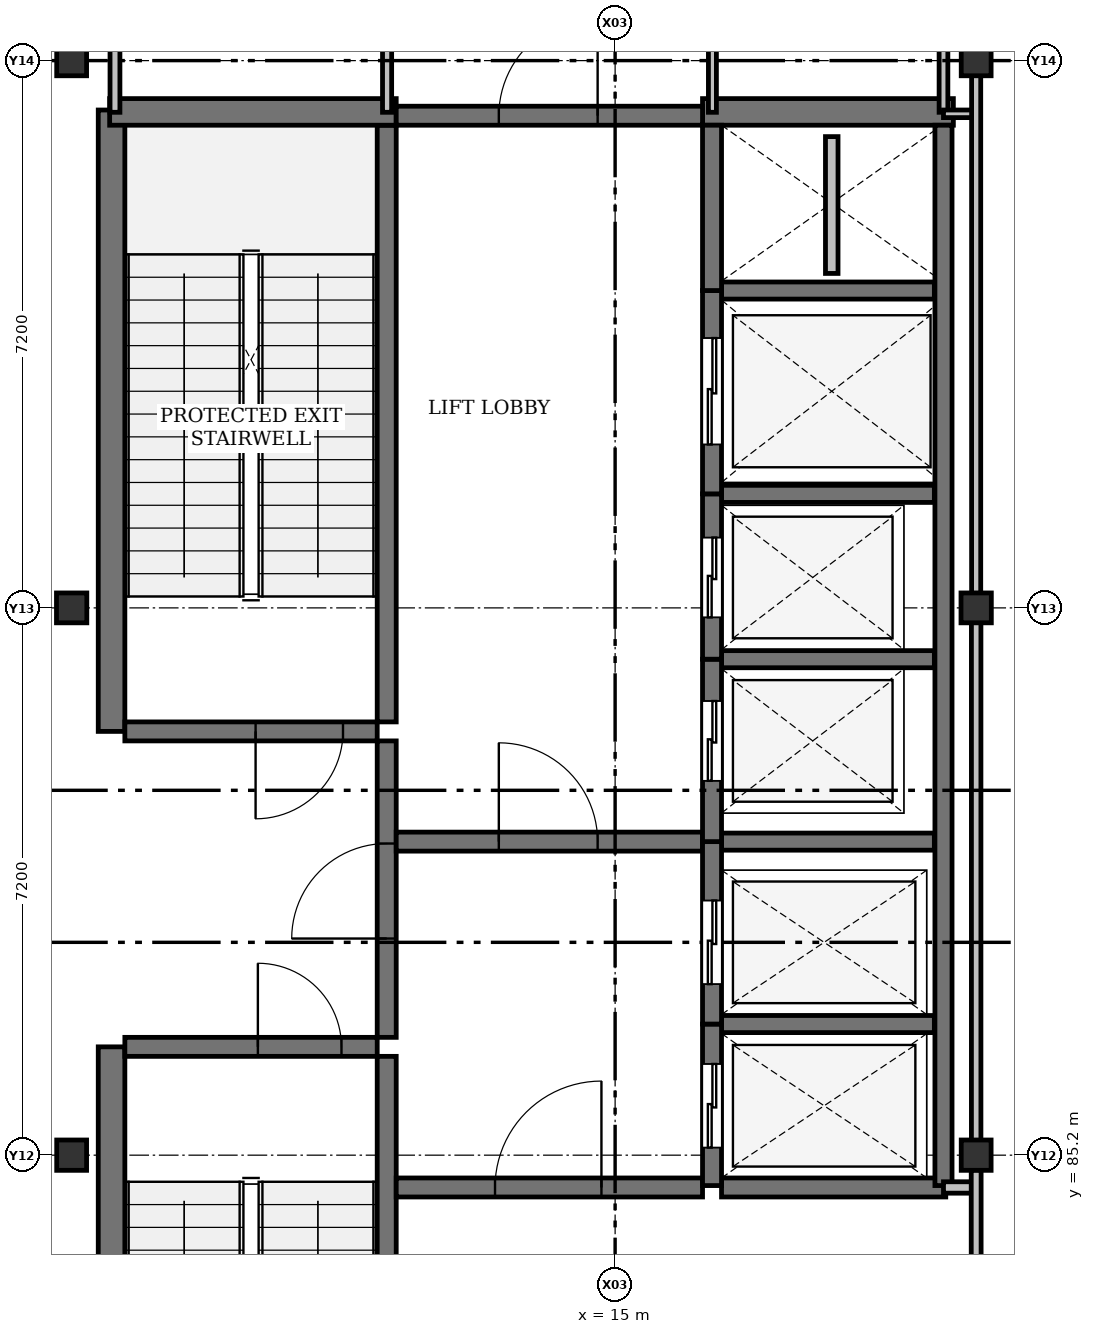
"""IFC4 building model, lengths in metres.
Left out: names, types, materials, properties, quantities, classifications, styles, units other than length and angle.
Written with IfcOpenShell. Run it as: python <this file> out.ifc"""

import sys

from ifc_helpers import new_model, si_unit, direction, frame, frame_2d, origin, origin_2d, place, context, subcontext, project, spatial, rectangle, i_section, extrude, element, fill, save


model = new_model("IFC4")
c1 = context("Model", 3, precision=1e-05, world=origin(), true_north=direction((0.0, 1.0)))
c2 = subcontext(c1, "Body", "Model", "MODEL_VIEW")
j1 = project(units=[si_unit("LENGTHUNIT", "METRE"), si_unit("PLANEANGLEUNIT", "RADIAN")], contexts=[c1])
p1 = place(None, origin())
s1 = spatial("IfcSite", under=j1, at=p1, CompositionType="ELEMENT")
p2 = place(p1, origin())
s2 = spatial("IfcBuilding", under=s1, at=p2, CompositionType="ELEMENT")
p3 = place(p2, origin())
s3 = spatial("IfcBuildingStorey", under=s2, at=p3, CompositionType="ELEMENT", Elevation=0.0)
for number, where, z_axis, x_axis in (
    (1, (7.85, 85.2, 0.0), (0.0, 0.0, 1.0), (0.0, 1.0, 0.0)),
    (2, (19.75, 85.2, 0.0), (0.0, 0.0, 1.0), (0.0, 1.0, 0.0)),
    (3, (7.85, 92.4, 0.0), (0.0, 0.0, 1.0), (1.0, 0.0, 0.0)),
    (4, (19.75, 92.4, 0.0), (0.0, 0.0, 1.0), (1.0, 0.0, 0.0)),
    (5, (7.85, 99.6, 0.0), (0.0, 0.0, 1.0), (0.0, 1.0, 0.0)),
    (6, (19.75, 99.6, 0.0), (0.0, 0.0, 1.0), (0.0, 1.0, 0.0)),
):
    element("IfcColumn", number, at=place(p3, frame(where, z_axis=z_axis, x_axis=x_axis)), inside=s3, PredefinedType="COLUMN", context=c2, shape_type="SweptSolid", body=[
        extrude(i_section(OverallWidth=0.399, OverallDepth=0.393, WebThickness=0.023, FlangeThickness=0.036, FilletRadius=0.015, at=origin_2d()), origin(), (0.0, 0.0, 1.0), 5.4),
    ])
for number, where, z_axis, x_axis in (
    (7, (8.375, 78.45, 0.0), (0.0, 0.0, 1.0), (0.0, 1.0, 0.0)),
    (8, (8.375, 90.775, 0.0), (0.0, 0.0, 1.0), (0.0, 1.0, 0.0)),
):
    element("IfcWall", number, at=place(p3, frame(where, z_axis=z_axis, x_axis=x_axis)), inside=s3, PredefinedType="SHEAR", context=c2, shape_type="SweptSolid", body=[
        extrude(rectangle(XDim=8.175, YDim=0.35, at=frame_2d((4.087, 0.0))), origin(), (0.0, 0.0, 1.0), 5.4),
    ])
for number, where, z_axis, x_axis in (
    (9, (11.995, 78.65, 0.0), (0.0, 0.0, 1.0), (0.0, 1.0, 0.0)),
    (10, (11.995, 90.9, 0.0), (0.0, 0.0, 1.0), (0.0, 1.0, 0.0)),
):
    element("IfcWall", number, at=place(p3, frame(where, z_axis=z_axis, x_axis=x_axis)), inside=s3, PredefinedType="SHEAR", context=c2, shape_type="SweptSolid", body=[
        extrude(rectangle(XDim=7.85, YDim=0.25, at=frame_2d((3.925, 0.0))), origin(), (0.0, 0.0, 1.0), 5.4),
    ])
p4 = place(p3, frame((11.995, 86.75, 0.0), z_axis=(0.0, 0.0, 1.0), x_axis=(0.0, 1.0, 0.0)))
e11 = element("IfcWall", 11, at=p4, inside=s3, PredefinedType="SHEAR", context=c2, shape_type="SweptSolid", body=[
    extrude(rectangle(XDim=3.9, YDim=0.25, at=frame_2d((1.95, 0.0))), origin(), (0.0, 0.0, 1.0), 5.4),
])
p5 = place(p4, frame((1.3, 0.0, 0.0)))
e12 = element("IfcOpeningElement", 12, at=p5, cuts=e11, PredefinedType="OPENING", context=c2, shape_type="SweptSolid", body=[
    extrude(rectangle(XDim=1.25, YDim=2.2, at=frame_2d((0.625, 1.1))), frame((0.0, 0.125, 0.0), z_axis=(0.0, -1.0, 0.0), x_axis=(1.0, 0.0, 0.0)), (0.0, 0.0, 1.0), 0.25),
])
p6 = place(p3, frame((8.35, 98.925, 0.0), z_axis=(0.0, 0.0, 1.0), x_axis=(1.0, 0.0, 0.0)))
e13 = element("IfcWall", 13, at=p6, inside=s3, PredefinedType="SHEAR", context=c2, shape_type="SweptSolid", body=[
    extrude(rectangle(XDim=3.77, YDim=0.35, at=frame_2d((1.885, 0.0))), origin(), (0.0, 0.0, 1.0), 5.4),
])
p7 = place(p3, frame((16.15, 98.925, 0.0), z_axis=(0.0, 0.0, 1.0), x_axis=(1.0, 0.0, 0.0)))
e14 = element("IfcWall", 14, at=p7, inside=s3, PredefinedType="SHEAR", context=c2, shape_type="SweptSolid", body=[
    extrude(rectangle(XDim=3.3, YDim=0.35, at=frame_2d((1.65, 0.0))), origin(), (0.0, 0.0, 1.0), 5.4),
])
p8 = place(p3, frame((12.12, 98.875, 0.0), z_axis=(0.0, 0.0, 1.0), x_axis=(1.0, 0.0, 0.0)))
e15 = element("IfcWall", 15, at=p8, inside=s3, PredefinedType="SHEAR", context=c2, shape_type="SweptSolid", body=[
    extrude(rectangle(XDim=4.03, YDim=0.25, at=frame_2d((2.015, 0.0))), origin(), (0.0, 0.0, 1.0), 5.4),
])
p9 = place(p8, frame((1.35, 0.0, 0.0)))
e16 = element("IfcOpeningElement", 16, at=p9, cuts=e15, PredefinedType="OPENING", context=c2, shape_type="SweptSolid", body=[
    extrude(rectangle(XDim=1.3, YDim=2.2, at=frame_2d((0.65, 1.1))), frame((0.0, 0.125, 0.0), z_axis=(0.0, -1.0, 0.0), x_axis=(1.0, 0.0, 0.0)), (0.0, 0.0, 1.0), 0.25),
])
p10 = place(p3, frame((8.55, 86.625, 0.0), z_axis=(0.0, 0.0, 1.0), x_axis=(1.0, 0.0, 0.0)))
e17 = element("IfcWall", 17, at=p10, inside=s3, PredefinedType="SHEAR", context=c2, shape_type="SweptSolid", body=[
    extrude(rectangle(XDim=3.32, YDim=0.25, at=frame_2d((1.66, 0.0))), origin(), (0.0, 0.0, 1.0), 5.4),
])
p11 = place(p10, frame((1.75, 0.0, 0.0)))
e18 = element("IfcOpeningElement", 18, at=p11, cuts=e17, PredefinedType="OPENING", context=c2, shape_type="SweptSolid", body=[
    extrude(rectangle(XDim=1.1, YDim=2.15, at=frame_2d((0.55, 1.075))), frame((0.0, 0.125, 0.0), z_axis=(0.0, -1.0, 0.0), x_axis=(1.0, 0.0, 0.0)), (0.0, 0.0, 1.0), 0.25),
])
p12 = place(p3, frame((11.87, 90.775, 0.0), z_axis=(0.0, 0.0, 1.0), x_axis=(-1.0, 0.0, 0.0)))
e19 = element("IfcWall", 19, at=p12, inside=s3, PredefinedType="SHEAR", context=c2, shape_type="SweptSolid", body=[
    extrude(rectangle(XDim=3.32, YDim=0.25, at=frame_2d((1.66, 0.0))), origin(), (0.0, 0.0, 1.0), 5.4),
])
p13 = place(p12, frame((0.45, 0.0, 0.0)))
e20 = element("IfcOpeningElement", 20, at=p13, cuts=e19, PredefinedType="OPENING", context=c2, shape_type="SweptSolid", body=[
    extrude(rectangle(XDim=1.15, YDim=2.15, at=frame_2d((0.575, 1.075))), frame((0.0, 0.125, 0.0), z_axis=(0.0, -1.0, 0.0), x_axis=(1.0, 0.0, 0.0)), (0.0, 0.0, 1.0), 0.25),
])
p14 = place(p3, frame((12.12, 89.325, 0.0), z_axis=(0.0, 0.0, 1.0), x_axis=(1.0, 0.0, 0.0)))
e21 = element("IfcWall", 21, at=p14, inside=s3, PredefinedType="SHEAR", context=c2, shape_type="SweptSolid", body=[
    extrude(rectangle(XDim=4.03, YDim=0.25, at=frame_2d((2.015, 0.0))), origin(), (0.0, 0.0, 1.0), 5.4),
])
p15 = place(p14, frame((1.35, 0.0, 0.0)))
e22 = element("IfcOpeningElement", 22, at=p15, cuts=e21, PredefinedType="OPENING", context=c2, shape_type="SweptSolid", body=[
    extrude(rectangle(XDim=1.3, YDim=2.2, at=frame_2d((0.65, 1.1))), frame((0.0, 0.125, 0.0), z_axis=(0.0, -1.0, 0.0), x_axis=(1.0, 0.0, 0.0)), (0.0, 0.0, 1.0), 0.25),
])
p16 = place(p3, frame((12.12, 84.775, 0.0), z_axis=(0.0, 0.0, 1.0), x_axis=(1.0, 0.0, 0.0)))
e23 = element("IfcWall", 23, at=p16, inside=s3, PredefinedType="SHEAR", context=c2, shape_type="SweptSolid", body=[
    extrude(rectangle(XDim=4.03, YDim=0.25, at=frame_2d((2.015, 0.0))), origin(), (0.0, 0.0, 1.0), 5.4),
])
p17 = place(p16, frame((1.3, 0.0, 0.0)))
e24 = element("IfcOpeningElement", 24, at=p17, cuts=e23, PredefinedType="OPENING", context=c2, shape_type="SweptSolid", body=[
    extrude(rectangle(XDim=1.4, YDim=2.25, at=frame_2d((0.7, 1.125))), frame((0.0, 0.125, 0.0), z_axis=(0.0, -1.0, 0.0), x_axis=(1.0, 0.0, 0.0)), (0.0, 0.0, 1.0), 0.25),
])
p18 = place(p3, frame((16.4, 84.775, 0.0), z_axis=(0.0, 0.0, 1.0), x_axis=(1.0, 0.0, 0.0)))
e25 = element("IfcWall", 25, at=p18, inside=s3, PredefinedType="SHEAR", context=c2, shape_type="SweptSolid", body=[
    extrude(rectangle(XDim=2.95, YDim=0.25, at=frame_2d((1.475, 0.0))), origin(), (0.0, 0.0, 1.0), 5.4),
])
p19 = place(p3, frame((19.32, 84.8, 0.0), z_axis=(0.0, 0.0, 1.0), x_axis=(0.0, 1.0, 0.0)))
e26 = element("IfcWall", 26, at=p19, inside=s3, PredefinedType="SHEAR", context=c2, shape_type="SweptSolid", body=[
    extrude(rectangle(XDim=13.95, YDim=0.225, at=frame_2d((6.975, 0.0))), origin(), (0.0, 0.0, 1.0), 5.4),
])
for number, where, z_axis, x_axis in (
    (27, (16.4, 86.925, 0.0), (0.0, 0.0, 1.0), (1.0, 0.0, 0.0)),
    (28, (16.4, 89.325, 0.0), (0.0, 0.0, 1.0), (1.0, 0.0, 0.0)),
    (29, (16.4, 91.725, 0.0), (0.0, 0.0, 1.0), (1.0, 0.0, 0.0)),
    (30, (16.4, 93.9, 0.0), (0.0, 0.0, 1.0), (1.0, 0.0, 0.0)),
    (31, (16.4, 96.575, 0.0), (0.0, 0.0, 1.0), (1.0, 0.0, 0.0)),
):
    element("IfcWall", number, at=place(p3, frame(where, z_axis=z_axis, x_axis=x_axis)), inside=s3, PredefinedType="SHEAR", context=c2, shape_type="SweptSolid", body=[
        extrude(rectangle(XDim=2.8, YDim=0.225, at=frame_2d((1.4, 0.0))), origin(), (0.0, 0.0, 1.0), 5.4),
    ])
p20 = place(p3, frame((16.275, 84.8, 0.0), z_axis=(0.0, 0.0, 1.0), x_axis=(0.0, 1.0, 0.0)))
e32 = element("IfcWall", 32, at=p20, inside=s3, PredefinedType="SHEAR", context=c2, shape_type="SweptSolid", body=[
    extrude(rectangle(XDim=2.125, YDim=0.25, at=frame_2d((1.062, 0.0))), origin(), (0.0, 0.0, 1.0), 5.4),
])
p21 = place(p20, frame((0.5, 0.0, 0.0)))
e33 = element("IfcOpeningElement", 33, at=p21, cuts=e32, PredefinedType="OPENING", context=c2, shape_type="SweptSolid", body=[
    extrude(rectangle(XDim=1.1, YDim=2.15, at=frame_2d((0.55, 1.075))), frame((0.0, 0.125, 0.0), z_axis=(0.0, -1.0, 0.0), x_axis=(1.0, 0.0, 0.0)), (0.0, 0.0, 1.0), 0.25),
])
p22 = place(p3, frame((16.275, 86.925, 0.0), z_axis=(0.0, 0.0, 1.0), x_axis=(0.0, 1.0, 0.0)))
e34 = element("IfcWall", 34, at=p22, inside=s3, PredefinedType="SHEAR", context=c2, shape_type="SweptSolid", body=[
    extrude(rectangle(XDim=2.4, YDim=0.25, at=frame_2d((1.2, 0.0))), origin(), (0.0, 0.0, 1.0), 5.4),
])
p23 = place(p22, frame((0.525, 0.0, 0.0)))
e35 = element("IfcOpeningElement", 35, at=p23, cuts=e34, PredefinedType="OPENING", context=c2, shape_type="SweptSolid", body=[
    extrude(rectangle(XDim=1.1, YDim=2.15, at=frame_2d((0.55, 1.075))), frame((0.0, 0.125, 0.0), z_axis=(0.0, -1.0, 0.0), x_axis=(1.0, 0.0, 0.0)), (0.0, 0.0, 1.0), 0.25),
])
p24 = place(p3, frame((16.275, 89.325, 0.0), z_axis=(0.0, 0.0, 1.0), x_axis=(0.0, 1.0, 0.0)))
e36 = element("IfcWall", 36, at=p24, inside=s3, PredefinedType="SHEAR", context=c2, shape_type="SweptSolid", body=[
    extrude(rectangle(XDim=2.4, YDim=0.25, at=frame_2d((1.2, 0.0))), origin(), (0.0, 0.0, 1.0), 5.4),
])
p25 = place(p24, frame((0.8, 0.0, 0.0)))
e37 = element("IfcOpeningElement", 37, at=p25, cuts=e36, PredefinedType="OPENING", context=c2, shape_type="SweptSolid", body=[
    extrude(rectangle(XDim=1.05, YDim=2.15, at=frame_2d((0.525, 1.075))), frame((0.0, 0.125, 0.0), z_axis=(0.0, -1.0, 0.0), x_axis=(1.0, 0.0, 0.0)), (0.0, 0.0, 1.0), 0.25),
])
p26 = place(p3, frame((16.275, 91.725, 0.0), z_axis=(0.0, 0.0, 1.0), x_axis=(0.0, 1.0, 0.0)))
e38 = element("IfcWall", 38, at=p26, inside=s3, PredefinedType="SHEAR", context=c2, shape_type="SweptSolid", body=[
    extrude(rectangle(XDim=2.175, YDim=0.25, at=frame_2d((1.087, 0.0))), origin(), (0.0, 0.0, 1.0), 5.4),
])
p27 = place(p26, frame((0.55, 0.0, 0.0)))
e39 = element("IfcOpeningElement", 39, at=p27, cuts=e38, PredefinedType="OPENING", context=c2, shape_type="SweptSolid", body=[
    extrude(rectangle(XDim=1.05, YDim=2.15, at=frame_2d((0.525, 1.075))), frame((0.0, 0.125, 0.0), z_axis=(0.0, -1.0, 0.0), x_axis=(1.0, 0.0, 0.0)), (0.0, 0.0, 1.0), 0.25),
])
p28 = place(p3, frame((16.275, 93.9, 0.0), z_axis=(0.0, 0.0, 1.0), x_axis=(0.0, 1.0, 0.0)))
e40 = element("IfcWall", 40, at=p28, inside=s3, PredefinedType="SHEAR", context=c2, shape_type="SweptSolid", body=[
    extrude(rectangle(XDim=2.675, YDim=0.25, at=frame_2d((1.337, 0.0))), origin(), (0.0, 0.0, 1.0), 5.4),
])
p29 = place(p28, frame((0.65, 0.0, 0.0)))
e41 = element("IfcOpeningElement", 41, at=p29, cuts=e40, PredefinedType="OPENING", context=c2, shape_type="SweptSolid", body=[
    extrude(rectangle(XDim=1.4, YDim=2.25, at=frame_2d((0.7, 1.125))), frame((0.0, 0.125, 0.0), z_axis=(0.0, -1.0, 0.0), x_axis=(1.0, 0.0, 0.0)), (0.0, 0.0, 1.0), 0.25),
])
p30 = place(p3, frame((16.275, 96.575, 0.0), z_axis=(0.0, 0.0, 1.0), x_axis=(0.0, 1.0, 0.0)))
e42 = element("IfcWall", 42, at=p30, inside=s3, PredefinedType="SHEAR", context=c2, shape_type="SweptSolid", body=[
    extrude(rectangle(XDim=2.175, YDim=0.25, at=frame_2d((1.087, 0.0))), origin(), (0.0, 0.0, 1.0), 5.4),
])
p31 = place(p3, frame((17.85, 96.8, 0.0), z_axis=(0.0, 0.0, 1.0), x_axis=(0.0, 1.0, 0.0)))
e43 = element("IfcWall", 43, at=p31, inside=s3, PredefinedType="PLUMBINGWALL", context=c2, shape_type="SweptSolid", body=[
    extrude(rectangle(XDim=1.8, YDim=0.165, at=frame_2d((0.9, 0.0))), origin(), (0.0, 0.0, 1.0), 5.4),
])
p32 = place(p3, frame((8.42, 98.92, 0.0), z_axis=(0.0, 0.0, 1.0), x_axis=(0.0, 1.0, 0.0)))
e44 = element("IfcWall", 44, at=p32, inside=s3, PredefinedType="PARTITIONING", context=c2, shape_type="SweptSolid", body=[
    extrude(rectangle(XDim=2.74, YDim=0.13, at=frame_2d((1.37, 0.0))), origin(), (0.0, 0.0, 1.0), 4.651),
])
p33 = place(p3, frame((12.0, 101.6, 0.0), z_axis=(0.0, 0.0, 1.0), x_axis=(0.0, -1.0, 0.0)))
e45 = element("IfcWall", 45, at=p33, inside=s3, PredefinedType="PARTITIONING", context=c2, shape_type="SweptSolid", body=[
    extrude(rectangle(XDim=2.68, YDim=0.12, at=frame_2d((1.34, 0.0))), origin(), (0.0, 0.0, 1.0), 4.651),
])
p34 = place(p33, frame((0.815, 0.0, 0.0)))
e46 = element("IfcOpeningElement", 46, at=p34, cuts=e45, PredefinedType="OPENING", context=c2, shape_type="SweptSolid", body=[
    extrude(rectangle(XDim=1.05, YDim=2.1, at=frame_2d((0.525, 1.05))), frame((0.0, 0.06, 0.0), z_axis=(0.0, -1.0, 0.0), x_axis=(1.0, 0.0, 0.0)), (0.0, 0.0, 1.0), 0.12),
])
p35 = place(p3, frame((19.32, 98.92, 0.0), z_axis=(0.0, 0.0, 1.0), x_axis=(0.0, 1.0, 0.0)))
e47 = element("IfcWall", 47, at=p35, inside=s3, PredefinedType="PARTITIONING", context=c2, shape_type="SweptSolid", body=[
    extrude(rectangle(XDim=2.74, YDim=0.115, at=frame_2d((1.37, 0.0))), origin(), (0.0, 0.0, 1.0), 4.651),
])
p36 = place(p3, frame((16.28, 98.92, 0.0), z_axis=(0.0, 0.0, 1.0), x_axis=(0.0, 1.0, 0.0)))
e48 = element("IfcWall", 48, at=p36, inside=s3, PredefinedType="PARTITIONING", context=c2, shape_type="SweptSolid", body=[
    extrude(rectangle(XDim=2.68, YDim=0.105, at=frame_2d((1.34, 0.0))), origin(), (0.0, 0.0, 1.0), 4.651),
])
p37 = place(p36, frame((0.88, 0.0, 0.0)))
e49 = element("IfcOpeningElement", 49, at=p37, cuts=e48, PredefinedType="OPENING", context=c2, shape_type="SweptSolid", body=[
    extrude(rectangle(XDim=0.92, YDim=2.15, at=frame_2d((0.46, 1.075))), frame((0.0, 0.052, 0.0), z_axis=(0.0, -1.0, 0.0), x_axis=(1.0, 0.0, 0.0)), (0.0, 0.0, 1.0), 0.105),
])
p38 = place(p3, frame((19.75, 98.9, 0.0), z_axis=(0.0, 0.0, 1.0), x_axis=(-1.0, 0.0, 0.0)))
e50 = element("IfcWall", 50, at=p38, inside=s3, PredefinedType="PARTITIONING", context=c2, shape_type="SweptSolid", body=[
    extrude(rectangle(XDim=0.43, YDim=0.1, at=frame_2d((0.215, 0.0))), origin(), (0.0, 0.0, 1.0), 4.727),
])
p39 = place(p3, frame((19.32, 84.775, 0.0), z_axis=(0.0, 0.0, 1.0), x_axis=(1.0, 0.0, 0.0)))
e51 = element("IfcWall", 51, at=p39, inside=s3, PredefinedType="PARTITIONING", context=c2, shape_type="SweptSolid", body=[
    extrude(rectangle(XDim=0.43, YDim=0.15, at=frame_2d((0.215, 0.0))), origin(), (0.0, 0.0, 1.0), 4.727),
])
p40 = place(p3, frame((19.75, 85.006, 0.0), z_axis=(0.0, 0.0, 1.0), x_axis=(0.0, -1.0, 0.0)))
e52 = element("IfcWall", 52, at=p40, inside=s3, PredefinedType="PARTITIONING", context=c2, shape_type="SweptSolid", body=[
    extrude(rectangle(XDim=6.814, YDim=0.13, at=frame_2d((3.407, 0.0))), origin(), (0.0, 0.0, 1.0), 4.727),
])
p41 = place(p3, frame((19.75, 92.208, 0.0), z_axis=(0.0, 0.0, 1.0), x_axis=(0.0, -1.0, 0.0)))
e53 = element("IfcWall", 53, at=p41, inside=s3, PredefinedType="PARTITIONING", context=c2, shape_type="SweptSolid", body=[
    extrude(rectangle(XDim=6.814, YDim=0.125, at=frame_2d((3.407, 0.0))), origin(), (0.0, 0.0, 1.0), 4.727),
])
p42 = place(p3, frame((19.75, 99.406, 0.0), z_axis=(0.0, 0.0, 1.0), x_axis=(0.0, -1.0, 0.0)))
e54 = element("IfcWall", 54, at=p42, inside=s3, PredefinedType="PARTITIONING", context=c2, shape_type="SweptSolid", body=[
    extrude(rectangle(XDim=6.814, YDim=0.12, at=frame_2d((3.407, 0.0))), origin(), (0.0, 0.0, 1.0), 4.727),
])
p43 = place(p5, origin())
e55 = element("IfcDoor", 55, at=p43, inside=s3, OperationType="SINGLE_SWING_LEFT", PredefinedType="DOOR", context=c2, shape_type="SweptSolid", body=[
    extrude(rectangle(XDim=1.25, YDim=2.2, at=frame_2d((0.625, 1.1))), frame((0.0, 0.025, 0.0), z_axis=(0.0, -1.0, 0.0), x_axis=(1.0, 0.0, 0.0)), (0.0, 0.0, 1.0), 0.05),
])
fill(e12, e55)
p44 = place(p9, origin())
e56 = element("IfcDoor", 56, at=p44, inside=s3, OperationType="SINGLE_SWING_RIGHT", PredefinedType="DOOR", context=c2, shape_type="SweptSolid", body=[
    extrude(rectangle(XDim=1.3, YDim=2.2, at=frame_2d((0.65, 1.1))), frame((0.0, 0.025, 0.0), z_axis=(0.0, -1.0, 0.0), x_axis=(1.0, 0.0, 0.0)), (0.0, 0.0, 1.0), 0.05),
])
fill(e16, e56)
p45 = place(p11, origin())
e57 = element("IfcDoor", 57, at=p45, inside=s3, OperationType="SINGLE_SWING_LEFT", PredefinedType="DOOR", context=c2, shape_type="SweptSolid", body=[
    extrude(rectangle(XDim=1.1, YDim=2.15, at=frame_2d((0.55, 1.075))), frame((0.0, 0.025, 0.0), z_axis=(0.0, -1.0, 0.0), x_axis=(1.0, 0.0, 0.0)), (0.0, 0.0, 1.0), 0.05),
])
fill(e18, e57)
p46 = place(p13, origin())
e58 = element("IfcDoor", 58, at=p46, inside=s3, OperationType="SINGLE_SWING_RIGHT", PredefinedType="DOOR", context=c2, shape_type="SweptSolid", body=[
    extrude(rectangle(XDim=1.15, YDim=2.15, at=frame_2d((0.575, 1.075))), frame((0.0, 0.025, 0.0), z_axis=(0.0, -1.0, 0.0), x_axis=(1.0, 0.0, 0.0)), (0.0, 0.0, 1.0), 0.05),
])
fill(e20, e58)
p47 = place(p15, origin())
e59 = element("IfcDoor", 59, at=p47, inside=s3, OperationType="SINGLE_SWING_LEFT", PredefinedType="DOOR", context=c2, shape_type="SweptSolid", body=[
    extrude(rectangle(XDim=1.3, YDim=2.2, at=frame_2d((0.65, 1.1))), frame((0.0, 0.025, 0.0), z_axis=(0.0, -1.0, 0.0), x_axis=(1.0, 0.0, 0.0)), (0.0, 0.0, 1.0), 0.05),
])
fill(e22, e59)
p48 = place(p17, origin())
e60 = element("IfcDoor", 60, at=p48, inside=s3, OperationType="SINGLE_SWING_RIGHT", PredefinedType="DOOR", context=c2, shape_type="SweptSolid", body=[
    extrude(rectangle(XDim=1.4, YDim=2.25, at=frame_2d((0.7, 1.125))), frame((0.0, 0.025, 0.0), z_axis=(0.0, -1.0, 0.0), x_axis=(1.0, 0.0, 0.0)), (0.0, 0.0, 1.0), 0.05),
])
fill(e24, e60)
p49 = place(p21, origin())
e61 = element("IfcDoor", 61, at=p49, inside=s3, OperationType="SLIDING_TO_LEFT", PredefinedType="DOOR", context=c2, shape_type="SweptSolid", body=[
    extrude(rectangle(XDim=1.1, YDim=2.15, at=frame_2d((0.55, 1.075))), frame((0.0, 0.025, 0.0), z_axis=(0.0, -1.0, 0.0), x_axis=(1.0, 0.0, 0.0)), (0.0, 0.0, 1.0), 0.05),
])
fill(e33, e61)
p50 = place(p23, origin())
e62 = element("IfcDoor", 62, at=p50, inside=s3, OperationType="SLIDING_TO_LEFT", PredefinedType="DOOR", context=c2, shape_type="SweptSolid", body=[
    extrude(rectangle(XDim=1.1, YDim=2.15, at=frame_2d((0.55, 1.075))), frame((0.0, 0.025, 0.0), z_axis=(0.0, -1.0, 0.0), x_axis=(1.0, 0.0, 0.0)), (0.0, 0.0, 1.0), 0.05),
])
fill(e35, e62)
p51 = place(p25, origin())
e63 = element("IfcDoor", 63, at=p51, inside=s3, OperationType="SLIDING_TO_LEFT", PredefinedType="DOOR", context=c2, shape_type="SweptSolid", body=[
    extrude(rectangle(XDim=1.05, YDim=2.15, at=frame_2d((0.525, 1.075))), frame((0.0, 0.025, 0.0), z_axis=(0.0, -1.0, 0.0), x_axis=(1.0, 0.0, 0.0)), (0.0, 0.0, 1.0), 0.05),
])
fill(e37, e63)
p52 = place(p27, origin())
e64 = element("IfcDoor", 64, at=p52, inside=s3, OperationType="SLIDING_TO_LEFT", PredefinedType="DOOR", context=c2, shape_type="SweptSolid", body=[
    extrude(rectangle(XDim=1.05, YDim=2.15, at=frame_2d((0.525, 1.075))), frame((0.0, 0.025, 0.0), z_axis=(0.0, -1.0, 0.0), x_axis=(1.0, 0.0, 0.0)), (0.0, 0.0, 1.0), 0.05),
])
fill(e39, e64)
p53 = place(p29, origin())
e65 = element("IfcDoor", 65, at=p53, inside=s3, OperationType="SLIDING_TO_LEFT", PredefinedType="DOOR", context=c2, shape_type="SweptSolid", body=[
    extrude(rectangle(XDim=1.4, YDim=2.25, at=frame_2d((0.7, 1.125))), frame((0.0, 0.025, 0.0), z_axis=(0.0, -1.0, 0.0), x_axis=(1.0, 0.0, 0.0)), (0.0, 0.0, 1.0), 0.05),
])
fill(e41, e65)
save(model, sys.argv[1])
